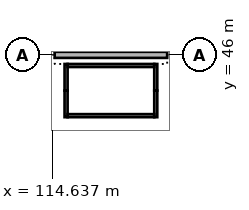
"""IFC4 building model, lengths in metres.
Left out: names, types, materials, properties, quantities, classifications, styles, units other than length and angle.
Written with IfcOpenShell. Run it as: python <this file> out.ifc"""

import sys

from ifc_helpers import new_model, si_unit, direction, frame, frame_2d, origin, origin_2d, place, context, subcontext, project, spatial, rectangle, extrude, element, fill, save


model = new_model("IFC4")
c1 = context("Model", 3, precision=1e-05, world=origin(), true_north=direction((0.0, 1.0)))
c2 = subcontext(c1, "Body", "Model", "MODEL_VIEW")
j1 = project(units=[si_unit("LENGTHUNIT", "METRE"), si_unit("PLANEANGLEUNIT", "RADIAN")], contexts=[c1])
p1 = place(None, origin())
s1 = spatial("IfcSite", under=j1, at=p1, CompositionType="ELEMENT")
p2 = place(p1, origin())
s2 = spatial("IfcBuilding", under=s1, at=p2, CompositionType="ELEMENT")
p3 = place(p2, origin())
s3 = spatial("IfcBuildingStorey", under=s2, at=p3, CompositionType="ELEMENT", Elevation=0.0)
for number, where, z_axis, x_axis in (
    (1, (114.0, 46.0, 0.0), (0.0, 0.0, 1.0), (1.0, 0.0, 0.0)),
    (2, (123.0, 46.0, 0.0), (0.0, 0.0, 1.0), (1.0, 0.0, 0.0)),
):
    element("IfcColumn", number, at=place(p3, frame(where, z_axis=z_axis, x_axis=x_axis)), inside=s3, PredefinedType="COLUMN", context=c2, shape_type="SweptSolid", body=[
        extrude(rectangle(XDim=1.6, YDim=1.2, at=origin_2d()), origin(), (0.0, 0.0, 1.0), 5.0),
    ])
for number, where, z_axis, x_axis in (
    (3, (115.55, 45.4, 0.0), (0.0, 0.0, 1.0), (0.0, -1.0, 0.0)),
    (4, (115.55, 43.65, 0.0), (0.0, 0.0, 1.0), (0.0, -1.0, 0.0)),
    (5, (121.45, 45.4, 0.0), (0.0, 0.0, 1.0), (0.0, -1.0, 0.0)),
    (6, (121.45, 43.65, 0.0), (0.0, 0.0, 1.0), (0.0, -1.0, 0.0)),
):
    element("IfcWall", number, at=place(p3, frame(where, z_axis=z_axis, x_axis=x_axis)), inside=s3, PredefinedType="SOLIDWALL", context=c2, shape_type="SweptSolid", body=[
        extrude(rectangle(XDim=1.75, YDim=0.2, at=frame_2d((0.875, 0.0))), origin(), (0.0, 0.0, 1.0), 3.2),
    ])
p4 = place(p3, frame((115.65, 42.0, 0.0), z_axis=(0.0, 0.0, 1.0), x_axis=(1.0, 0.0, 0.0)))
e7 = element("IfcWall", 7, at=p4, inside=s3, PredefinedType="SOLIDWALL", context=c2, shape_type="SweptSolid", body=[
    extrude(rectangle(XDim=5.7, YDim=0.2, at=frame_2d((2.85, 0.0))), origin(), (0.0, 0.0, 1.0), 3.2),
])
p5 = place(p4, frame((0.2, 0.0, 0.0)))
e8 = element("IfcOpeningElement", 8, at=p5, cuts=e7, PredefinedType="OPENING", context=c2, shape_type="SweptSolid", body=[
    extrude(rectangle(XDim=1.1, YDim=2.1, at=frame_2d((0.55, 1.05))), frame((0.0, 0.11, 0.0), z_axis=(0.0, -1.0, 0.0), x_axis=(1.0, 0.0, 0.0)), (0.0, 0.0, 1.0), 0.22),
])
p6 = place(p3, frame((115.65, 45.3, 0.0), z_axis=(0.0, 0.0, 1.0), x_axis=(1.0, 0.0, 0.0)))
e9 = element("IfcWall", 9, at=p6, inside=s3, PredefinedType="SOLIDWALL", context=c2, shape_type="SweptSolid", body=[
    extrude(rectangle(XDim=5.7, YDim=0.2, at=frame_2d((2.85, 0.0))), origin(), (0.0, 0.0, 1.0), 3.2),
])
p7 = place(p3, frame((114.8, 46.0, 0.0), z_axis=(0.0, 0.0, 1.0), x_axis=(1.0, 0.0, 0.0)))
e10 = element("IfcWall", 10, at=p7, inside=s3, PredefinedType="SOLIDWALL", context=c2, shape_type="SweptSolid", body=[
    extrude(rectangle(XDim=7.4, YDim=0.4, at=frame_2d((3.7, 0.0))), origin(), (0.0, 0.0, 1.0), 4.4),
])
p8 = place(p7, frame((1.45, 0.0, 0.0)))
e11 = element("IfcOpeningElement", 11, at=p8, cuts=e10, PredefinedType="OPENING", context=c2, shape_type="SweptSolid", body=[
    extrude(rectangle(XDim=4.5, YDim=4.3, at=frame_2d((2.25, 2.15))), frame((0.0, 0.21, 0.0), z_axis=(0.0, -1.0, 0.0), x_axis=(1.0, 0.0, 0.0)), (0.0, 0.0, 1.0), 0.42),
])
p9 = place(p5, frame((1.1, 0.0, 0.0), z_axis=(0.0, 0.0, 1.0), x_axis=(-1.0, 0.0, 0.0)))
e12 = element("IfcDoor", 12, at=p9, inside=s3, OperationType="SINGLE_SWING_LEFT", PredefinedType="DOOR", context=c2, shape_type="SweptSolid", body=[
    extrude(rectangle(XDim=1.1, YDim=2.1, at=frame_2d((0.55, 1.05))), frame((0.0, 0.025, 0.0), z_axis=(0.0, -1.0, 0.0), x_axis=(1.0, 0.0, 0.0)), (0.0, 0.0, 1.0), 0.05),
])
fill(e8, e12)
p10 = place(p8, frame((4.5, 0.0, 0.0), z_axis=(0.0, 0.0, 1.0), x_axis=(-1.0, 0.0, 0.0)))
e13 = element("IfcDoor", 13, at=p10, inside=s3, OperationType="ROLLINGUP", PredefinedType="DOOR", context=c2, shape_type="SweptSolid", body=[
    extrude(rectangle(XDim=4.5, YDim=4.3, at=frame_2d((2.25, 2.15))), frame((0.0, 0.025, 0.0), z_axis=(0.0, -1.0, 0.0), x_axis=(1.0, 0.0, 0.0)), (0.0, 0.0, 1.0), 0.05),
])
fill(e11, e13)
save(model, sys.argv[1])
